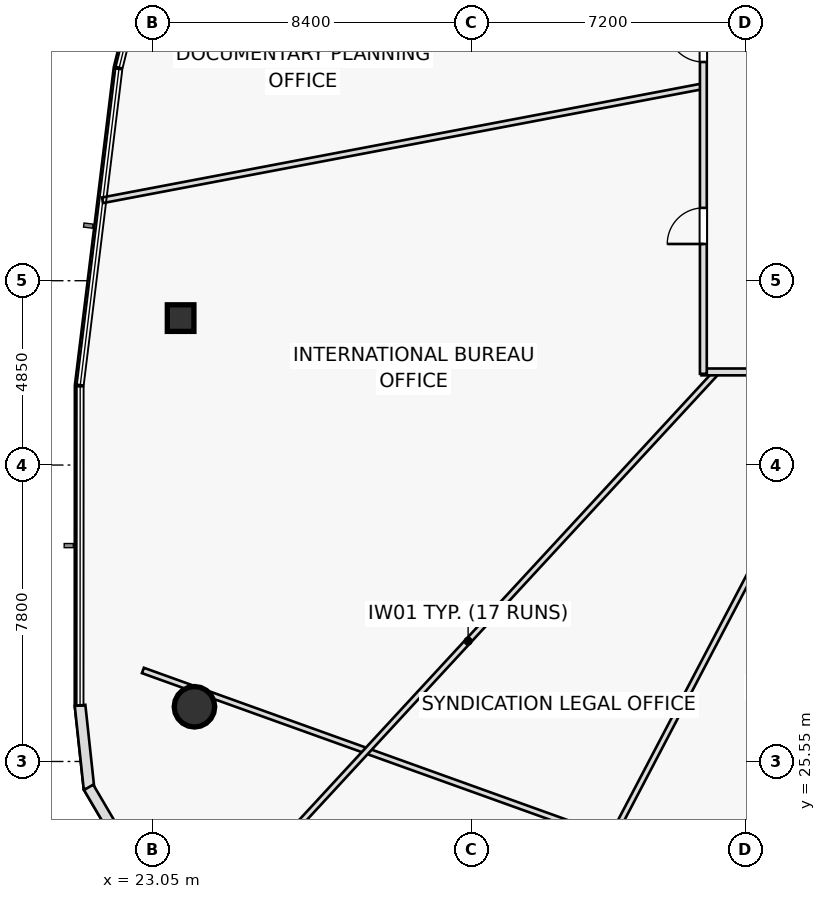
"""IFC4 building model, lengths in metres.
Left out: names, types, materials, properties, quantities, classifications, styles, units other than length and angle.
Written with IfcOpenShell. Run it as: python <this file> out.ifc"""

import sys

from ifc_helpers import new_model, si_unit, direction, frame, frame_2d, origin, origin_2d, place, context, subcontext, project, spatial, rectangle, hollow_rectangle, hollow_circle, extrude, element, fill, save


model = new_model("IFC4")
c1 = context("Model", 3, precision=1e-05, world=origin(), true_north=direction((0.0, 1.0)))
c2 = subcontext(c1, "Body", "Model", "MODEL_VIEW")
j1 = project(units=[si_unit("LENGTHUNIT", "METRE"), si_unit("PLANEANGLEUNIT", "RADIAN")], contexts=[c1])
p1 = place(None, origin())
s1 = spatial("IfcSite", under=j1, at=p1, CompositionType="ELEMENT")
p2 = place(p1, origin())
s2 = spatial("IfcBuilding", under=s1, at=p2, CompositionType="ELEMENT")
p3 = place(p2, frame((0.0, 0.0, 78.3)))
s3 = spatial("IfcBuildingStorey", under=s2, at=p3, CompositionType="ELEMENT", Elevation=78.3)
p4 = place(p3, frame((23.795, 37.216, 0.0), z_axis=(0.0, 0.0, 1.0), x_axis=(1.0, 0.0, 0.0)))
e1 = element("IfcColumn", 1, at=p4, inside=s3, PredefinedType="COLUMN", context=c2, shape_type="SweptSolid", body=[
    extrude(hollow_rectangle(XDim=0.7, YDim=0.7, WallThickness=0.04, at=origin_2d()), origin(), (0.0, 0.0, 1.0), 3.6),
])
p5 = place(p3, frame((24.159, 26.99, 0.0), z_axis=(0.0, 0.0, 1.0), x_axis=(1.0, 0.0, 0.0)))
e2 = element("IfcColumn", 2, at=p5, inside=s3, PredefinedType="COLUMN", context=c2, shape_type="SweptSolid", body=[
    extrude(hollow_circle(Radius=0.533, WallThickness=0.045, at=origin_2d()), origin(), (0.0, 0.0, 1.0), 3.6),
])
p6 = place(p3, frame((22.802, 27.945, 0.0), z_axis=(0.0, 0.0, 1.0), x_axis=(0.941102349209, -0.338121824662, 0.0)))
e3 = element("IfcWall", 3, at=p6, inside=s3, PredefinedType="PARTITIONING", context=c2, shape_type="SweptSolid", body=[
    extrude(rectangle(XDim=13.18, YDim=0.15, at=frame_2d((6.59, 0.0))), origin(), (0.0, 0.0, 1.0), 2.975),
])
p7 = place(p3, frame((37.55, 43.319, 0.0), z_axis=(0.0, 0.0, 1.0), x_axis=(-0.982437746544, -0.186590659376, 0.0)))
e4 = element("IfcWall", 4, at=p7, inside=s3, PredefinedType="PARTITIONING", context=c2, shape_type="SweptSolid", body=[
    extrude(rectangle(XDim=16.094, YDim=0.15, at=frame_2d((8.047, 0.0))), origin(), (0.0, 0.0, 1.0), 3.025),
])
p8 = place(p3, frame((37.903, 35.8, 0.0), z_axis=(0.0, 0.0, 1.0), x_axis=(-0.678491433726, -0.734608313566, 0.0)))
e5 = element("IfcWall", 5, at=p8, inside=s3, PredefinedType="PARTITIONING", context=c2, shape_type="SweptSolid", body=[
    extrude(rectangle(XDim=19.286, YDim=0.15, at=frame_2d((9.643, 0.0))), origin(), (0.0, 0.0, 1.0), 2.975),
])
p9 = place(p3, frame((41.575, 35.8, 0.0), z_axis=(0.0, 0.0, 1.0), x_axis=(-0.464491295954, -0.885577684895, 0.0)))
e6 = element("IfcWall", 6, at=p9, inside=s3, PredefinedType="PARTITIONING", context=c2, shape_type="SweptSolid", body=[
    extrude(rectangle(XDim=17.026, YDim=0.15, at=frame_2d((8.513, 0.0))), origin(), (0.0, 0.0, 1.0), 2.975),
])
p10 = place(p3, frame((59.65, 35.8, 0.0), z_axis=(0.0, 0.0, 1.0), x_axis=(-1.0, 0.0, 0.0)))
e7 = element("IfcWall", 7, at=p10, inside=s3, PredefinedType="PARTITIONING", context=c2, shape_type="SweptSolid", body=[
    extrude(rectangle(XDim=22.15, YDim=0.18, at=frame_2d((11.075, 0.0))), origin(), (0.0, 0.0, 1.0), 2.975),
])
p11 = place(p10, frame((1.911, 0.0, 0.0)))
e8 = element("IfcOpeningElement", 8, at=p11, cuts=e7, PredefinedType="OPENING", context=c2, shape_type="SweptSolid", body=[
    extrude(rectangle(XDim=0.95, YDim=2.05, at=frame_2d((0.475, 1.025))), frame((0.0, 0.1, 0.0), z_axis=(0.0, -1.0, 0.0), x_axis=(1.0, 0.0, 0.0)), (0.0, 0.0, 1.0), 0.2),
])
p12 = place(p10, frame((8.314, 0.0, 0.0)))
e9 = element("IfcOpeningElement", 9, at=p12, cuts=e7, PredefinedType="OPENING", context=c2, shape_type="SweptSolid", body=[
    extrude(rectangle(XDim=0.95, YDim=2.05, at=frame_2d((0.475, 1.025))), frame((0.0, 0.1, 0.0), z_axis=(0.0, -1.0, 0.0), x_axis=(1.0, 0.0, 0.0)), (0.0, 0.0, 1.0), 0.2),
])
p13 = place(p10, frame((15.147, 0.0, 0.0)))
e10 = element("IfcOpeningElement", 10, at=p13, cuts=e7, PredefinedType="OPENING", context=c2, shape_type="SweptSolid", body=[
    extrude(rectangle(XDim=0.95, YDim=2.05, at=frame_2d((0.475, 1.025))), frame((0.0, 0.1, 0.0), z_axis=(0.0, -1.0, 0.0), x_axis=(1.0, 0.0, 0.0)), (0.0, 0.0, 1.0), 0.2),
])
p14 = place(p10, frame((19.517, 0.0, 0.0)))
e11 = element("IfcOpeningElement", 11, at=p14, cuts=e7, PredefinedType="OPENING", context=c2, shape_type="SweptSolid", body=[
    extrude(rectangle(XDim=0.95, YDim=2.05, at=frame_2d((0.475, 1.025))), frame((0.0, 0.1, 0.0), z_axis=(0.0, -1.0, 0.0), x_axis=(1.0, 0.0, 0.0)), (0.0, 0.0, 1.0), 0.2),
])
p15 = place(p3, frame((37.55, 35.75, 0.0), z_axis=(0.0, 0.0, 1.0), x_axis=(0.0, 1.0, 0.0)))
e12 = element("IfcWall", 12, at=p15, inside=s3, PredefinedType="PARTITIONING", context=c2, shape_type="SweptSolid", body=[
    extrude(rectangle(XDim=12.75, YDim=0.18, at=frame_2d((6.375, 0.0))), origin(), (0.0, 0.0, 1.0), 2.975),
])
p16 = place(p15, frame((3.417, 0.0, 0.0)))
e13 = element("IfcOpeningElement", 13, at=p16, cuts=e12, PredefinedType="OPENING", context=c2, shape_type="SweptSolid", body=[
    extrude(rectangle(XDim=0.95, YDim=2.05, at=frame_2d((0.475, 1.025))), frame((0.0, 0.1, 0.0), z_axis=(0.0, -1.0, 0.0), x_axis=(1.0, 0.0, 0.0)), (0.0, 0.0, 1.0), 0.2),
])
p17 = place(p15, frame((8.205, 0.0, 0.0)))
e14 = element("IfcOpeningElement", 14, at=p17, cuts=e12, PredefinedType="OPENING", context=c2, shape_type="SweptSolid", body=[
    extrude(rectangle(XDim=0.95, YDim=2.05, at=frame_2d((0.475, 1.025))), frame((0.0, 0.1, 0.0), z_axis=(0.0, -1.0, 0.0), x_axis=(1.0, 0.0, 0.0)), (0.0, 0.0, 1.0), 0.2),
])
p18 = place(p15, frame((10.687, 0.0, 0.0)))
e15 = element("IfcOpeningElement", 15, at=p18, cuts=e12, PredefinedType="OPENING", context=c2, shape_type="SweptSolid", body=[
    extrude(rectangle(XDim=0.95, YDim=2.05, at=frame_2d((0.475, 1.025))), frame((0.0, 0.1, 0.0), z_axis=(0.0, -1.0, 0.0), x_axis=(1.0, 0.0, 0.0)), (0.0, 0.0, 1.0), 0.2),
])
p19 = place(p3, frame((21.148, 27.026, 0.0), z_axis=(0.0, 0.0, 1.0), x_axis=(0.107149267674, -0.994242945379, 0.0)))
e16 = element("IfcWall", 16, at=p19, inside=s3, PredefinedType="STANDARD", context=c2, shape_type="SweptSolid", body=[
    extrude(rectangle(XDim=2.197, YDim=0.28, at=frame_2d((1.098, 0.0))), origin(), (0.0, 0.0, 1.0), 3.6),
])
p20 = place(p3, frame((21.375, 24.87, 0.0), z_axis=(0.0, 0.0, 1.0), x_axis=(0.506751518171, -0.862092163769, 0.0)))
e17 = element("IfcWall", 17, at=p20, inside=s3, PredefinedType="STANDARD", context=c2, shape_type="SweptSolid", body=[
    extrude(rectangle(XDim=2.185, YDim=0.28, at=frame_2d((1.092, 0.0))), origin(), (0.0, 0.0, 1.0), 3.6),
])
p21 = place(p16, origin())
e18 = element("IfcDoor", 18, at=p21, inside=s3, OperationType="SINGLE_SWING_LEFT", PredefinedType="DOOR", context=c2, shape_type="SweptSolid", body=[
    extrude(rectangle(XDim=0.95, YDim=2.05, at=frame_2d((0.475, 1.025))), frame((0.0, 0.025, 0.0), z_axis=(0.0, -1.0, 0.0), x_axis=(1.0, 0.0, 0.0)), (0.0, 0.0, 1.0), 0.05),
])
fill(e13, e18)
p22 = place(p17, origin())
e19 = element("IfcDoor", 19, at=p22, inside=s3, OperationType="SINGLE_SWING_RIGHT", PredefinedType="DOOR", context=c2, shape_type="SweptSolid", body=[
    extrude(rectangle(XDim=0.95, YDim=2.05, at=frame_2d((0.475, 1.025))), frame((0.0, 0.025, 0.0), z_axis=(0.0, -1.0, 0.0), x_axis=(1.0, 0.0, 0.0)), (0.0, 0.0, 1.0), 0.05),
])
fill(e14, e19)
save(model, sys.argv[1])
